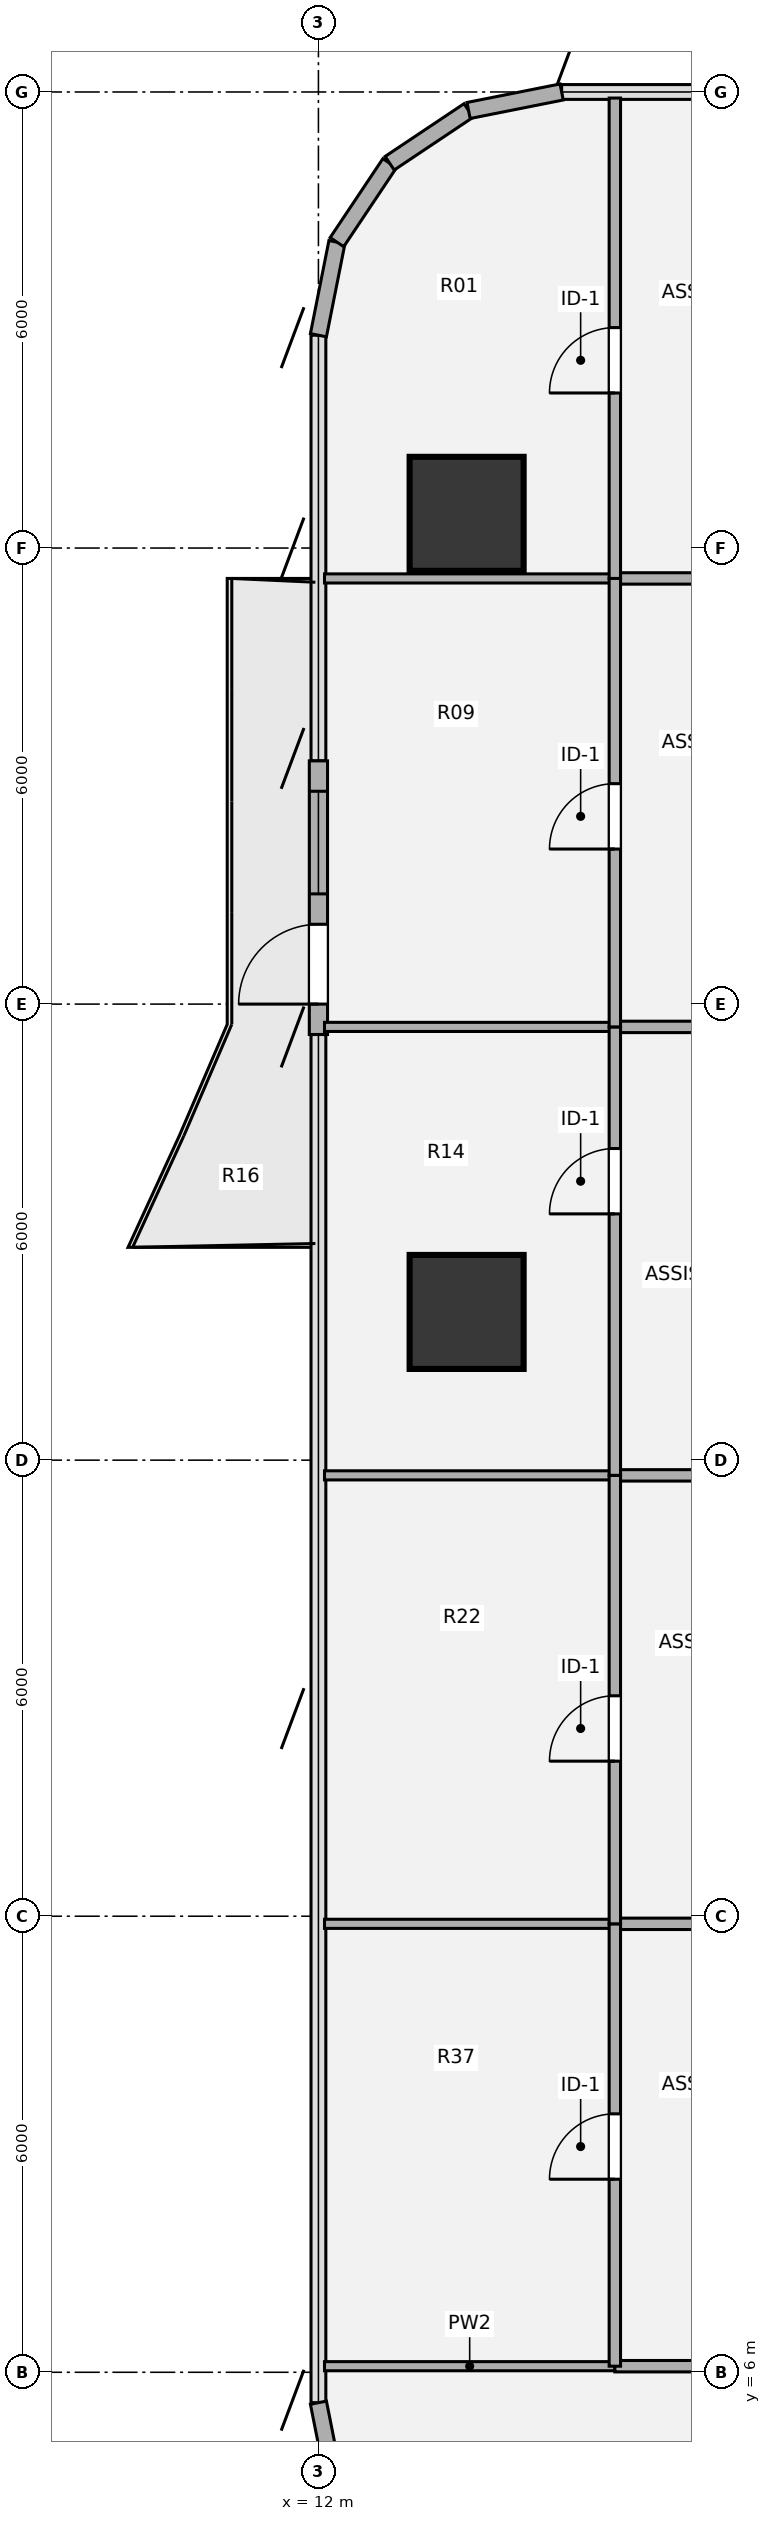
"""IFC4 building model, lengths in metres.
Left out: names, types, materials, properties, quantities, classifications, styles, units other than length and angle.
Written with IfcOpenShell. Run it as: python <this file> out.ifc"""

import sys

from ifc_helpers import new_model, si_unit, direction, frame, frame_2d, origin, origin_2d, place, context, subcontext, project, spatial, rectangle, hollow_circle, extrude, source, transform, mapped, element, fill, save


model = new_model("IFC4")
c1 = context("Model", 3, precision=1e-05, world=origin(), true_north=direction((0.0, 1.0)))
c2 = subcontext(c1, "Body", "Model", "MODEL_VIEW")
j1 = project(units=[si_unit("LENGTHUNIT", "METRE"), si_unit("PLANEANGLEUNIT", "RADIAN")], contexts=[c1])
p1 = place(None, origin())
s1 = spatial("IfcSite", under=j1, at=p1, CompositionType="ELEMENT")
p2 = place(p1, origin())
s2 = spatial("IfcBuilding", under=s1, at=p2, CompositionType="ELEMENT")
p3 = place(p2, frame((0.0, 0.0, 42.12)))
s3 = spatial("IfcBuildingStorey", under=s2, at=p3, CompositionType="ELEMENT", Elevation=42.12)
m1 = source(origin(), c2, "Body", "SweptSolid", [
    extrude(hollow_circle(Radius=0.75, WallThickness=0.05, at=origin_2d()), origin(), (0.0, 0.0, 1.0), 3.78),
])
for number, where, z_axis, x_axis in (
    (1, (13.95, 19.95, 0.0), (0.0, 0.0, 1.0), (1.0, 0.0, 0.0)),
    (2, (13.95, 30.45, 0.0), (0.0, 0.0, 1.0), (1.0, 0.0, 0.0)),
):
    element("IfcColumn", number, at=place(p3, frame(where, z_axis=z_axis, x_axis=x_axis)), inside=s3, PredefinedType="COLUMN", context=c2, shape_type="MappedRepresentation", body=[
        mapped(m1, transform((0.0, 0.0, 0.0), x_axis=(1.0, 0.0, 0.0), y_axis=(0.0, 1.0, 0.0), z_axis=(0.0, 0.0, 1.0), scale=1.0)),
    ])
p4 = place(p3, frame((12.244, 4.375, 0.0), z_axis=(0.0, 0.0, 1.0), x_axis=(-0.195138390419, 0.980775717779, 0.0)))
e3 = element("IfcWall", 3, at=p4, inside=s3, PredefinedType="SOLIDWALL", context=c2, shape_type="SweptSolid", body=[
    extrude(rectangle(XDim=1.249, YDim=0.215, at=frame_2d((0.624, 0.0))), origin(), (0.0, 0.0, 1.0), 3.53),
])
p5 = place(p3, frame((12.0, 23.6, 0.0), z_axis=(0.0, 0.0, 1.0), x_axis=(0.0, 1.0, 0.0)))
e4 = element("IfcWall", 4, at=p5, inside=s3, PredefinedType="SOLIDWALL", context=c2, shape_type="SweptSolid", body=[
    extrude(rectangle(XDim=3.6, YDim=0.24, at=frame_2d((1.8, 0.0))), origin(), (0.0, 0.0, 1.0), 3.53),
])
p6 = place(p5, frame((0.4, 0.0, 0.0)))
e5 = element("IfcOpeningElement", 5, at=p6, cuts=e4, PredefinedType="OPENING", context=c2, shape_type="SweptSolid", body=[
    extrude(rectangle(XDim=1.05, YDim=2.15, at=origin_2d()), frame((0.525, 0.13, 1.075), z_axis=(0.0, -1.0, 0.0), x_axis=(1.0, 0.0, 0.0)), (0.0, 0.0, 1.0), 0.26),
])
p7 = place(p5, frame((1.85, 0.0, 0.85)))
e6 = element("IfcOpeningElement", 6, at=p7, cuts=e4, PredefinedType="OPENING", context=c2, shape_type="SweptSolid", body=[
    extrude(rectangle(XDim=1.35, YDim=1.35, at=origin_2d()), frame((0.675, 0.13, 0.675), z_axis=(0.0, -1.0, 0.0), x_axis=(1.0, 0.0, 0.0)), (0.0, 0.0, 1.0), 0.26),
])
for number, where, z_axis, x_axis in (
    (7, (12.0, 32.8, 0.0), (0.0, 0.0, 1.0), (0.195, 0.981, 0.0)),
    (8, (12.244, 34.025, 0.0), (0.0, 0.0, 1.0), (0.556, 0.831, 0.0)),
    (9, (12.937, 35.063, 0.0), (0.0, 0.0, 1.0), (0.831, 0.556, 0.0)),
    (10, (13.975, 35.756, 0.0), (0.0, 0.0, 1.0), (0.981, 0.195, 0.0)),
):
    element("IfcWall", number, at=place(p3, frame(where, z_axis=z_axis, x_axis=x_axis)), inside=s3, PredefinedType="SOLIDWALL", context=c2, shape_type="SweptSolid", body=[
        extrude(rectangle(XDim=1.249, YDim=0.215, at=frame_2d((0.624, 0.0))), origin(), (0.0, 0.0, 1.0), 3.53),
    ])
p8 = place(p3, frame((12.08, 6.08, 0.0), z_axis=(0.0, 0.0, 1.0), x_axis=(1.0, 0.0, 0.0)))
e11 = element("IfcWall", 11, at=p8, inside=s3, PredefinedType="PARTITIONING", context=c2, shape_type="SweptSolid", body=[
    extrude(rectangle(XDim=3.82, YDim=0.12, at=frame_2d((1.91, 0.0))), origin(), (0.0, 0.0, 1.0), 3.5),
])
p9 = place(p3, frame((15.9, 6.08, 0.0), z_axis=(0.0, 0.0, 1.0), x_axis=(1.0, 0.0, 0.0)))
e12 = element("IfcWall", 12, at=p9, inside=s3, PredefinedType="PARTITIONING", context=c2, shape_type="SweptSolid", body=[
    extrude(rectangle(XDim=6.2, YDim=0.15, at=frame_2d((3.1, 0.0))), origin(), (0.0, 0.0, 1.0), 3.5),
])
p10 = place(p3, frame((12.08, 11.9, 0.0), z_axis=(0.0, 0.0, 1.0), x_axis=(1.0, 0.0, 0.0)))
e13 = element("IfcWall", 13, at=p10, inside=s3, PredefinedType="PARTITIONING", context=c2, shape_type="SweptSolid", body=[
    extrude(rectangle(XDim=3.82, YDim=0.12, at=frame_2d((1.91, 0.0))), origin(), (0.0, 0.0, 1.0), 3.5),
])
p11 = place(p3, frame((15.9, 11.9, 0.0), z_axis=(0.0, 0.0, 1.0), x_axis=(1.0, 0.0, 0.0)))
e14 = element("IfcWall", 14, at=p11, inside=s3, PredefinedType="PARTITIONING", context=c2, shape_type="SweptSolid", body=[
    extrude(rectangle(XDim=6.2, YDim=0.15, at=frame_2d((3.1, 0.0))), origin(), (0.0, 0.0, 1.0), 3.5),
])
p12 = place(p3, frame((12.08, 17.8, 0.0), z_axis=(0.0, 0.0, 1.0), x_axis=(1.0, 0.0, 0.0)))
e15 = element("IfcWall", 15, at=p12, inside=s3, PredefinedType="PARTITIONING", context=c2, shape_type="SweptSolid", body=[
    extrude(rectangle(XDim=3.82, YDim=0.12, at=frame_2d((1.91, 0.0))), origin(), (0.0, 0.0, 1.0), 3.5),
])
p13 = place(p3, frame((15.9, 17.8, 0.0), z_axis=(0.0, 0.0, 1.0), x_axis=(1.0, 0.0, 0.0)))
e16 = element("IfcWall", 16, at=p13, inside=s3, PredefinedType="PARTITIONING", context=c2, shape_type="SweptSolid", body=[
    extrude(rectangle(XDim=6.2, YDim=0.15, at=frame_2d((3.1, 0.0))), origin(), (0.0, 0.0, 1.0), 3.5),
])
p14 = place(p3, frame((12.08, 23.7, 0.0), z_axis=(0.0, 0.0, 1.0), x_axis=(1.0, 0.0, 0.0)))
e17 = element("IfcWall", 17, at=p14, inside=s3, PredefinedType="PARTITIONING", context=c2, shape_type="SweptSolid", body=[
    extrude(rectangle(XDim=3.82, YDim=0.12, at=frame_2d((1.91, 0.0))), origin(), (0.0, 0.0, 1.0), 2.982),
])
p15 = place(p3, frame((15.9, 23.7, 0.0), z_axis=(0.0, 0.0, 1.0), x_axis=(1.0, 0.0, 0.0)))
e18 = element("IfcWall", 18, at=p15, inside=s3, PredefinedType="PARTITIONING", context=c2, shape_type="SweptSolid", body=[
    extrude(rectangle(XDim=6.2, YDim=0.15, at=frame_2d((3.1, 0.0))), origin(), (0.0, 0.0, 1.0), 2.982),
])
p16 = place(p3, frame((12.08, 29.6, 0.0), z_axis=(0.0, 0.0, 1.0), x_axis=(1.0, 0.0, 0.0)))
e19 = element("IfcWall", 19, at=p16, inside=s3, PredefinedType="PARTITIONING", context=c2, shape_type="SweptSolid", body=[
    extrude(rectangle(XDim=3.82, YDim=0.12, at=frame_2d((1.91, 0.0))), origin(), (0.0, 0.0, 1.0), 2.982),
])
p17 = place(p3, frame((15.9, 29.6, 0.0), z_axis=(0.0, 0.0, 1.0), x_axis=(1.0, 0.0, 0.0)))
e20 = element("IfcWall", 20, at=p17, inside=s3, PredefinedType="PARTITIONING", context=c2, shape_type="SweptSolid", body=[
    extrude(rectangle(XDim=6.2, YDim=0.15, at=frame_2d((3.1, 0.0))), origin(), (0.0, 0.0, 1.0), 2.982),
])
p18 = place(p3, frame((15.9, 6.08, 0.0), z_axis=(0.0, 0.0, 1.0), x_axis=(0.0, 1.0, 0.0)))
e21 = element("IfcWall", 21, at=p18, inside=s3, PredefinedType="PARTITIONING", context=c2, shape_type="SweptSolid", body=[
    extrude(rectangle(XDim=5.82, YDim=0.15, at=frame_2d((2.91, 0.0))), origin(), (0.0, 0.0, 1.0), 3.5),
])
p19 = place(p18, frame((2.46, 0.0, 0.0)))
e22 = element("IfcOpeningElement", 22, at=p19, cuts=e21, PredefinedType="OPENING", context=c2, shape_type="SweptSolid", body=[
    extrude(rectangle(XDim=0.86, YDim=2.1, at=origin_2d()), frame((0.43, 0.085, 1.05), z_axis=(0.0, -1.0, 0.0), x_axis=(1.0, 0.0, 0.0)), (0.0, 0.0, 1.0), 0.17),
])
p20 = place(p3, frame((15.9, 11.9, 0.0), z_axis=(0.0, 0.0, 1.0), x_axis=(0.0, 1.0, 0.0)))
e23 = element("IfcWall", 23, at=p20, inside=s3, PredefinedType="PARTITIONING", context=c2, shape_type="SweptSolid", body=[
    extrude(rectangle(XDim=5.9, YDim=0.15, at=frame_2d((2.95, 0.0))), origin(), (0.0, 0.0, 1.0), 3.5),
])
p21 = place(p20, frame((2.14, 0.0, 0.0)))
e24 = element("IfcOpeningElement", 24, at=p21, cuts=e23, PredefinedType="OPENING", context=c2, shape_type="SweptSolid", body=[
    extrude(rectangle(XDim=0.86, YDim=2.1, at=origin_2d()), frame((0.43, 0.085, 1.05), z_axis=(0.0, -1.0, 0.0), x_axis=(1.0, 0.0, 0.0)), (0.0, 0.0, 1.0), 0.17),
])
p22 = place(p3, frame((15.9, 17.8, 0.0), z_axis=(0.0, 0.0, 1.0), x_axis=(0.0, 1.0, 0.0)))
e25 = element("IfcWall", 25, at=p22, inside=s3, PredefinedType="PARTITIONING", context=c2, shape_type="SweptSolid", body=[
    extrude(rectangle(XDim=5.9, YDim=0.15, at=frame_2d((2.95, 0.0))), origin(), (0.0, 0.0, 1.0), 3.5),
])
p23 = place(p22, frame((3.44, 0.0, 0.0)))
e26 = element("IfcOpeningElement", 26, at=p23, cuts=e25, PredefinedType="OPENING", context=c2, shape_type="SweptSolid", body=[
    extrude(rectangle(XDim=0.86, YDim=2.1, at=origin_2d()), frame((0.43, 0.085, 1.05), z_axis=(0.0, -1.0, 0.0), x_axis=(1.0, 0.0, 0.0)), (0.0, 0.0, 1.0), 0.17),
])
p24 = place(p3, frame((15.9, 23.7, 0.0), z_axis=(0.0, 0.0, 1.0), x_axis=(0.0, 1.0, 0.0)))
e27 = element("IfcWall", 27, at=p24, inside=s3, PredefinedType="PARTITIONING", context=c2, shape_type="SweptSolid", body=[
    extrude(rectangle(XDim=5.9, YDim=0.15, at=frame_2d((2.95, 0.0))), origin(), (0.0, 0.0, 1.0), 3.5),
])
p25 = place(p24, frame((2.34, 0.0, 0.0)))
e28 = element("IfcOpeningElement", 28, at=p25, cuts=e27, PredefinedType="OPENING", context=c2, shape_type="SweptSolid", body=[
    extrude(rectangle(XDim=0.86, YDim=2.1, at=origin_2d()), frame((0.43, 0.085, 1.05), z_axis=(0.0, -1.0, 0.0), x_axis=(1.0, 0.0, 0.0)), (0.0, 0.0, 1.0), 0.17),
])
p26 = place(p3, frame((15.9, 29.6, 0.0), z_axis=(0.0, 0.0, 1.0), x_axis=(0.0, 1.0, 0.0)))
e29 = element("IfcWall", 29, at=p26, inside=s3, PredefinedType="PARTITIONING", context=c2, shape_type="SweptSolid", body=[
    extrude(rectangle(XDim=6.32, YDim=0.15, at=frame_2d((3.16, 0.0))), origin(), (0.0, 0.0, 1.0), 3.5),
])
p27 = place(p26, frame((2.44, 0.0, 0.0)))
e30 = element("IfcOpeningElement", 30, at=p27, cuts=e29, PredefinedType="OPENING", context=c2, shape_type="SweptSolid", body=[
    extrude(rectangle(XDim=0.86, YDim=2.1, at=origin_2d()), frame((0.43, 0.085, 1.05), z_axis=(0.0, -1.0, 0.0), x_axis=(1.0, 0.0, 0.0)), (0.0, 0.0, 1.0), 0.17),
])
m2 = source(origin(), c2, "Body", "SweptSolid", [
    extrude(rectangle(XDim=1.05, YDim=2.15, at=origin_2d()), frame((0.525, 0.025, 1.075), z_axis=(0.0, -1.0, 0.0), x_axis=(1.0, 0.0, 0.0)), (0.0, 0.0, 1.0), 0.05),
])
p28 = place(p6, origin())
e31 = element("IfcDoor", 31, at=p28, inside=s3, OperationType="SINGLE_SWING_LEFT", PredefinedType="DOOR", context=c2, shape_type="MappedRepresentation", body=[
    mapped(m2, transform((0.0, 0.0, 0.0), x_axis=(1.0, 0.0, 0.0), y_axis=(0.0, 1.0, 0.0), z_axis=(0.0, 0.0, 1.0), scale=1.0)),
])
fill(e5, e31)
m3 = source(origin(), c2, "Body", "SweptSolid", [
    extrude(rectangle(XDim=1.35, YDim=1.35, at=origin_2d()), frame((0.675, 0.03, 0.675), z_axis=(0.0, -1.0, 0.0), x_axis=(1.0, 0.0, 0.0)), (0.0, 0.0, 1.0), 0.06),
])
p29 = place(p7, origin())
e32 = element("IfcWindow", 32, at=p29, inside=s3, PartitioningType="SINGLE_PANEL", PredefinedType="WINDOW", context=c2, shape_type="MappedRepresentation", body=[
    mapped(m3, transform((0.0, 0.0, 0.0), x_axis=(1.0, 0.0, 0.0), y_axis=(0.0, 1.0, 0.0), z_axis=(0.0, 0.0, 1.0), scale=1.0)),
])
fill(e6, e32)
m4 = source(origin(), c2, "Body", "SweptSolid", [
    extrude(rectangle(XDim=0.86, YDim=2.1, at=origin_2d()), frame((0.43, 0.025, 1.05), z_axis=(0.0, -1.0, 0.0), x_axis=(1.0, 0.0, 0.0)), (0.0, 0.0, 1.0), 0.05),
])
p30 = place(p19, origin())
e33 = element("IfcDoor", 33, at=p30, inside=s3, OperationType="SINGLE_SWING_LEFT", PredefinedType="DOOR", context=c2, shape_type="MappedRepresentation", body=[
    mapped(m4, transform((0.0, 0.0, 0.0), x_axis=(1.0, 0.0, 0.0), y_axis=(0.0, 1.0, 0.0), z_axis=(0.0, 0.0, 1.0), scale=1.0)),
])
fill(e22, e33)
p31 = place(p21, origin())
e34 = element("IfcDoor", 34, at=p31, inside=s3, OperationType="SINGLE_SWING_LEFT", PredefinedType="DOOR", context=c2, shape_type="MappedRepresentation", body=[
    mapped(m4, transform((0.0, 0.0, 0.0), x_axis=(1.0, 0.0, 0.0), y_axis=(0.0, 1.0, 0.0), z_axis=(0.0, 0.0, 1.0), scale=1.0)),
])
fill(e24, e34)
p32 = place(p23, origin())
e35 = element("IfcDoor", 35, at=p32, inside=s3, OperationType="SINGLE_SWING_LEFT", PredefinedType="DOOR", context=c2, shape_type="MappedRepresentation", body=[
    mapped(m4, transform((0.0, 0.0, 0.0), x_axis=(1.0, 0.0, 0.0), y_axis=(0.0, 1.0, 0.0), z_axis=(0.0, 0.0, 1.0), scale=1.0)),
])
fill(e26, e35)
p33 = place(p25, origin())
e36 = element("IfcDoor", 36, at=p33, inside=s3, OperationType="SINGLE_SWING_LEFT", PredefinedType="DOOR", context=c2, shape_type="MappedRepresentation", body=[
    mapped(m4, transform((0.0, 0.0, 0.0), x_axis=(1.0, 0.0, 0.0), y_axis=(0.0, 1.0, 0.0), z_axis=(0.0, 0.0, 1.0), scale=1.0)),
])
fill(e28, e36)
p34 = place(p27, origin())
e37 = element("IfcDoor", 37, at=p34, inside=s3, OperationType="SINGLE_SWING_LEFT", PredefinedType="DOOR", context=c2, shape_type="MappedRepresentation", body=[
    mapped(m4, transform((0.0, 0.0, 0.0), x_axis=(1.0, 0.0, 0.0), y_axis=(0.0, 1.0, 0.0), z_axis=(0.0, 0.0, 1.0), scale=1.0)),
])
fill(e30, e37)
save(model, sys.argv[1])
